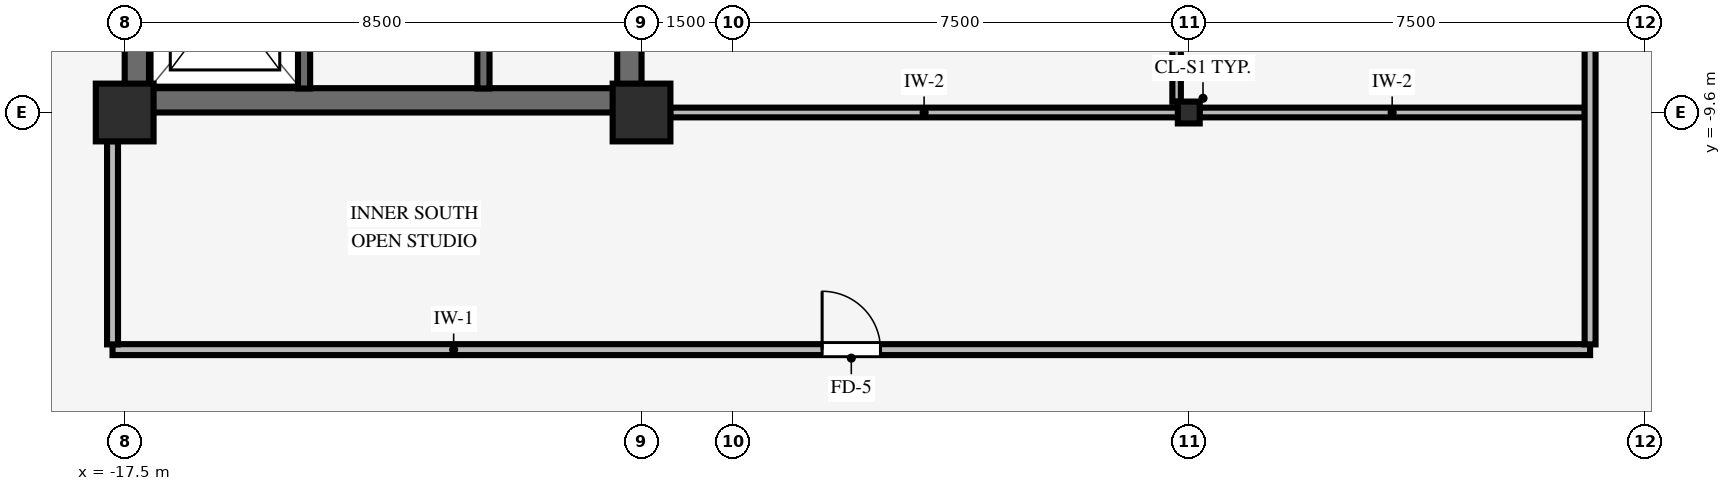
"""IFC4 building model, lengths in metres.
Left out: names, types, materials, properties, quantities, classifications, styles, units other than length and angle.
Written with IfcOpenShell. Run it as: python <this file> out.ifc"""

import sys

from ifc_helpers import new_model, si_unit, direction, frame, frame_2d, origin, origin_2d, place, context, subcontext, project, spatial, rectangle, i_section, extrude, source, transform, mapped, element, fill, save


model = new_model("IFC4")
c1 = context("Model", 3, precision=1e-05, world=origin(), true_north=direction((0.0, 1.0)))
c2 = subcontext(c1, "Body", "Model", "MODEL_VIEW")
j1 = project(units=[si_unit("LENGTHUNIT", "METRE"), si_unit("PLANEANGLEUNIT", "RADIAN")], contexts=[c1])
p1 = place(None, origin())
s1 = spatial("IfcSite", under=j1, at=p1, CompositionType="ELEMENT")
p2 = place(p1, origin())
s2 = spatial("IfcBuilding", under=s1, at=p2, CompositionType="ELEMENT")
p3 = place(p2, frame((0.0, 0.0, 138.45)))
s3 = spatial("IfcBuildingStorey", under=s2, at=p3, CompositionType="ELEMENT", Elevation=138.45)
p4 = place(p3, frame((-17.5, -9.4, 0.0), z_axis=(0.0, 0.0, 1.0), x_axis=(1.0, 0.0, 0.0)))
e1 = element("IfcWall", 1, at=p4, inside=s3, PredefinedType="SHEAR", context=c2, shape_type="SweptSolid", body=[
    extrude(rectangle(XDim=8.5, YDim=0.4, at=frame_2d((4.25, 0.0))), origin(), (0.0, 0.0, 1.0), 3.37),
])
p5 = place(p3, frame((-17.3, -9.205, 0.0), z_axis=(0.0, 0.0, 1.0), x_axis=(0.0, 1.0, 0.0)))
e2 = element("IfcWall", 2, at=p5, inside=s3, PredefinedType="SHEAR", context=c2, shape_type="SweptSolid", body=[
    extrude(rectangle(XDim=18.41, YDim=0.4, at=frame_2d((9.205, 0.0))), origin(), (0.0, 0.0, 1.0), 3.37),
])
p6 = place(p3, frame((-9.2, -9.205, 0.0), z_axis=(0.0, 0.0, 1.0), x_axis=(0.0, 1.0, 0.0)))
e3 = element("IfcWall", 3, at=p6, inside=s3, PredefinedType="SHEAR", context=c2, shape_type="SweptSolid", body=[
    extrude(rectangle(XDim=18.41, YDim=0.4, at=frame_2d((9.205, 0.0))), origin(), (0.0, 0.0, 1.0), 3.37),
])
p7 = place(p6, frame((8.605, 0.0, 0.0)))
e4 = element("IfcOpeningElement", 4, at=p7, cuts=e3, PredefinedType="OPENING", context=c2, shape_type="SweptSolid", body=[
    extrude(rectangle(XDim=1.2, YDim=2.15, at=frame_2d((0.6, 1.075))), frame((0.0, 0.21, 0.0), z_axis=(0.0, -1.0, 0.0), x_axis=(1.0, 0.0, 0.0)), (0.0, 0.0, 1.0), 0.42),
])
for number, where, z_axis, x_axis in (
    (5, (-17.5, -9.6, 0.0), (0.0, 0.0, 1.0), (1.0, 0.0, 0.0)),
    (6, (-9.0, -9.6, 0.0), (0.0, 0.0, 1.0), (1.0, 0.0, 0.0)),
):
    element("IfcColumn", number, at=place(p3, frame(where, z_axis=z_axis, x_axis=x_axis)), inside=s3, PredefinedType="COLUMN", context=c2, shape_type="SweptSolid", body=[
        extrude(rectangle(XDim=0.95, YDim=0.95, at=origin_2d()), origin(), (0.0, 0.0, 1.0), 3.37),
    ])
p8 = place(p3, frame((0.0, -9.6, 0.0), z_axis=(0.0, 0.0, 1.0), x_axis=(1.0, 0.0, 0.0)))
e7 = element("IfcColumn", 7, at=p8, inside=s3, PredefinedType="COLUMN", context=c2, shape_type="SweptSolid", body=[
    extrude(i_section(OverallWidth=0.36, OverallDepth=0.36, WebThickness=0.021, FlangeThickness=0.021, FilletRadius=0.018, at=origin_2d()), origin(), (0.0, 0.0, 1.0), 3.37),
])
p9 = place(p3, frame((-14.55, -9.205, 0.0), z_axis=(0.0, 0.0, 1.0), x_axis=(0.0, 1.0, 0.0)))
e8 = element("IfcWall", 8, at=p9, inside=s3, PredefinedType="SHEAR", context=c2, shape_type="SweptSolid", body=[
    extrude(rectangle(XDim=3.01, YDim=0.2, at=frame_2d((1.505, 0.0))), origin(), (0.0, 0.0, 1.0), 3.37),
])
p10 = place(p9, frame((0.93, 0.0, 0.0)))
e9 = element("IfcOpeningElement", 9, at=p10, cuts=e8, PredefinedType="OPENING", context=c2, shape_type="SweptSolid", body=[
    extrude(rectangle(XDim=1.15, YDim=2.15, at=frame_2d((0.575, 1.075))), frame((0.0, 0.11, 0.0), z_axis=(0.0, -1.0, 0.0), x_axis=(1.0, 0.0, 0.0)), (0.0, 0.0, 1.0), 0.22),
])
p11 = place(p3, frame((-11.6, -9.205, 0.0), z_axis=(0.0, 0.0, 1.0), x_axis=(0.0, 1.0, 0.0)))
e10 = element("IfcWall", 10, at=p11, inside=s3, PredefinedType="SHEAR", context=c2, shape_type="SweptSolid", body=[
    extrude(rectangle(XDim=7.975, YDim=0.2, at=frame_2d((3.988, 0.0))), origin(), (0.0, 0.0, 1.0), 3.37),
])
p12 = place(p11, frame((5.565, 0.0, 0.0)))
e11 = element("IfcOpeningElement", 11, at=p12, cuts=e10, PredefinedType="OPENING", context=c2, shape_type="SweptSolid", body=[
    extrude(rectangle(XDim=0.88, YDim=2.1, at=frame_2d((0.44, 1.05))), frame((0.0, 0.11, 0.0), z_axis=(0.0, -1.0, 0.0), x_axis=(1.0, 0.0, 0.0)), (0.0, 0.0, 1.0), 0.22),
])
p13 = place(p3, frame((-17.7, -13.5, 0.0), z_axis=(0.0, 0.0, 1.0), x_axis=(1.0, 0.0, 0.0)))
e12 = element("IfcWall", 12, at=p13, inside=s3, PredefinedType="PARTITIONING", context=c2, shape_type="SweptSolid", body=[
    extrude(rectangle(XDim=24.3, YDim=0.18, at=frame_2d((12.15, 0.0))), origin(), (0.0, 0.0, 1.0), 2.998),
])
p14 = place(p13, frame((11.67, 0.0, 0.0)))
e13 = element("IfcOpeningElement", 13, at=p14, cuts=e12, PredefinedType="OPENING", context=c2, shape_type="SweptSolid", body=[
    extrude(rectangle(XDim=0.96, YDim=2.1, at=frame_2d((0.48, 1.05))), frame((0.0, 0.1, 0.0), z_axis=(0.0, -1.0, 0.0), x_axis=(1.0, 0.0, 0.0)), (0.0, 0.0, 1.0), 0.2),
])
p15 = place(p3, frame((-8.529, -9.6, 0.0), z_axis=(0.0, 0.0, 1.0), x_axis=(1.0, 0.0, 0.0)))
e14 = element("IfcWall", 14, at=p15, inside=s3, PredefinedType="PARTITIONING", context=c2, shape_type="SweptSolid", body=[
    extrude(rectangle(XDim=8.353, YDim=0.16, at=frame_2d((4.177, 0.0))), origin(), (0.0, 0.0, 1.0), 2.405),
])
p16 = place(p3, frame((0.176, -9.6, 0.0), z_axis=(0.0, 0.0, 1.0), x_axis=(1.0, 0.0, 0.0)))
e15 = element("IfcWall", 15, at=p16, inside=s3, PredefinedType="PARTITIONING", context=c2, shape_type="SweptSolid", body=[
    extrude(rectangle(XDim=6.338, YDim=0.16, at=frame_2d((3.169, 0.0))), origin(), (0.0, 0.0, 1.0), 2.405),
])
p17 = place(p3, frame((-17.7, -13.414, 0.0), z_axis=(0.0, 0.0, 1.0), x_axis=(0.0, 1.0, 0.0)))
e16 = element("IfcWall", 16, at=p17, inside=s3, PredefinedType="PARTITIONING", context=c2, shape_type="SweptSolid", body=[
    extrude(rectangle(XDim=3.343, YDim=0.18, at=frame_2d((1.671, 0.0))), origin(), (0.0, 0.0, 1.0), 2.816),
])
p18 = place(p3, frame((-0.2, -9.424, 0.0), z_axis=(0.0, 0.0, 1.0), x_axis=(0.0, 1.0, 0.0)))
e17 = element("IfcWall", 17, at=p18, inside=s3, PredefinedType="PARTITIONING", context=c2, shape_type="SweptSolid", body=[
    extrude(rectangle(XDim=8.088, YDim=0.14, at=frame_2d((4.044, 0.0))), origin(), (0.0, 0.0, 1.0), 2.816),
])
p19 = place(p3, frame((6.6, -13.414, 0.0), z_axis=(0.0, 0.0, 1.0), x_axis=(0.0, 1.0, 0.0)))
e18 = element("IfcWall", 18, at=p19, inside=s3, PredefinedType="PARTITIONING", context=c2, shape_type="SweptSolid", body=[
    extrude(rectangle(XDim=12.078, YDim=0.18, at=frame_2d((6.039, 0.0))), origin(), (0.0, 0.0, 1.0), 3.36),
])
p20 = place(p19, frame((7.466, 0.0, 0.0)))
e19 = element("IfcOpeningElement", 19, at=p20, cuts=e18, PredefinedType="OPENING", context=c2, shape_type="SweptSolid", body=[
    extrude(rectangle(XDim=0.96, YDim=2.1, at=frame_2d((0.48, 1.05))), frame((0.0, 0.1, 0.0), z_axis=(0.0, -1.0, 0.0), x_axis=(1.0, 0.0, 0.0)), (0.0, 0.0, 1.0), 0.2),
])
m1 = source(origin(), c2, "Body", "SweptSolid", [
    extrude(rectangle(XDim=0.96, YDim=2.1, at=frame_2d((0.48, 1.05))), frame((0.0, 0.025, 0.0), z_axis=(0.0, -1.0, 0.0), x_axis=(1.0, 0.0, 0.0)), (0.0, 0.0, 1.0), 0.05),
])
p21 = place(p14, origin())
e20 = element("IfcDoor", 20, at=p21, inside=s3, OperationType="SINGLE_SWING_LEFT", PredefinedType="DOOR", context=c2, shape_type="MappedRepresentation", body=[
    mapped(m1, transform((0.0, 0.0, 0.0), scale=1.0)),
])
fill(e13, e20)
save(model, sys.argv[1])
